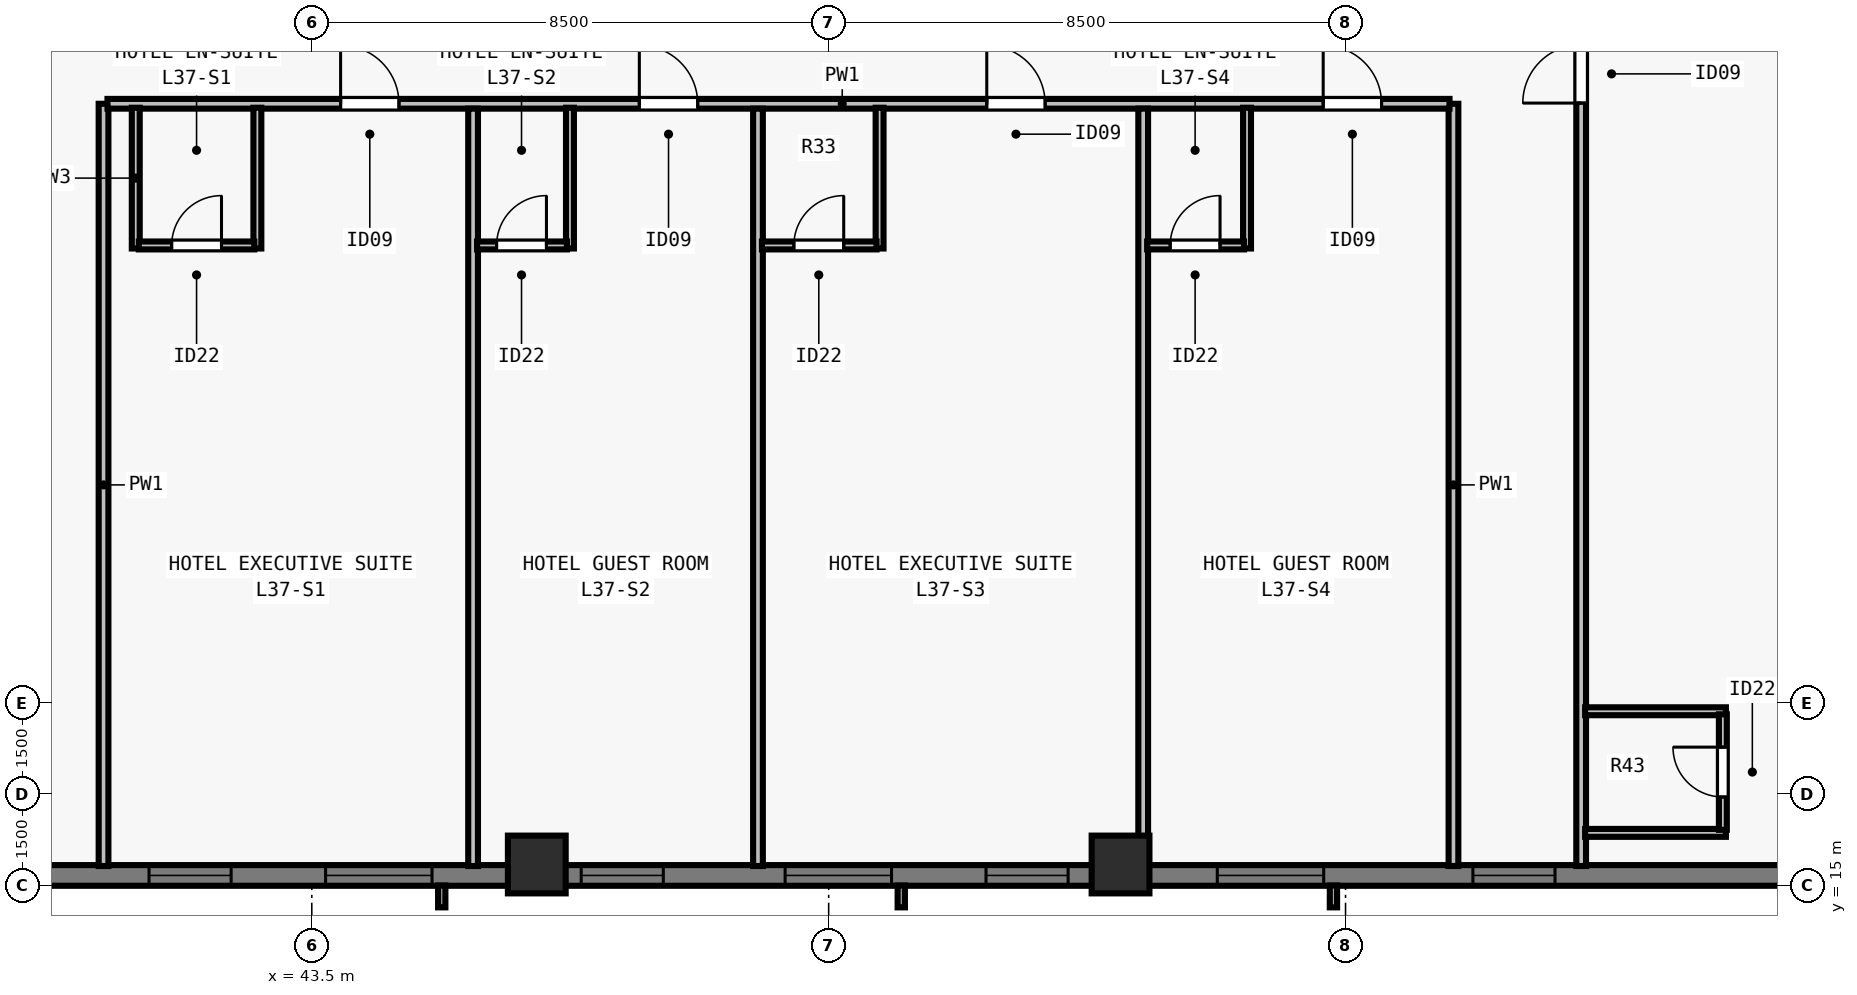
"""IFC4 building model, lengths in metres.
Left out: names, types, materials, properties, quantities, classifications, styles, units other than length and angle.
Written with IfcOpenShell. Run it as: python <this file> out.ifc"""

import sys

from ifc_helpers import new_model, si_unit, direction, frame, frame_2d, origin, origin_2d, place, context, subcontext, project, spatial, rectangle, extrude, element, fill, save


model = new_model("IFC4")
c1 = context("Model", 3, precision=1e-05, world=origin(), true_north=direction((0.0, 1.0)))
c2 = subcontext(c1, "Body", "Model", "MODEL_VIEW")
j1 = project(units=[si_unit("LENGTHUNIT", "METRE"), si_unit("PLANEANGLEUNIT", "RADIAN")], contexts=[c1])
p1 = place(None, origin())
s1 = spatial("IfcSite", under=j1, at=p1, CompositionType="ELEMENT")
p2 = place(p1, origin())
s2 = spatial("IfcBuilding", under=s1, at=p2, CompositionType="ELEMENT")
p3 = place(p2, frame((0.0, 0.0, 137.5)))
s3 = spatial("IfcBuildingStorey", under=s2, at=p3, CompositionType="ELEMENT", Elevation=137.5)
for number, where, z_axis, x_axis in (
    (1, (47.2, 15.35, 0.0), (0.0, 0.0, 1.0), (1.0, 0.0, 0.0)),
    (2, (56.8, 15.35, 0.0), (0.0, 0.0, 1.0), (1.0, 0.0, 0.0)),
):
    element("IfcColumn", number, at=place(p3, frame(where, z_axis=z_axis, x_axis=x_axis)), inside=s3, PredefinedType="COLUMN", context=c2, shape_type="SweptSolid", body=[
        extrude(rectangle(XDim=0.95, YDim=0.95, at=origin_2d()), origin(), (0.0, 0.0, 1.0), 3.5),
    ])
p4 = place(p3, frame((72.0, 15.17, 0.0), z_axis=(0.0, 0.0, 1.0), x_axis=(-1.0, 0.0, 0.0)))
e3 = element("IfcWall", 3, at=p4, inside=s3, PredefinedType="SOLIDWALL", context=c2, shape_type="SweptSolid", body=[
    extrude(rectangle(XDim=39.682, YDim=0.34, at=frame_2d((19.841, 0.0))), origin(), (0.0, 0.0, 1.0), 3.28),
])
p5 = place(p4, frame((8.055, 0.0, 0.8)))
e4 = element("IfcOpeningElement", 4, at=p5, cuts=e3, PredefinedType="OPENING", context=c2, shape_type="SweptSolid", body=[
    extrude(rectangle(XDim=1.35, YDim=1.66, at=frame_2d((0.675, 0.83))), frame((0.0, 0.18, 0.0), z_axis=(0.0, -1.0, 0.0), x_axis=(1.0, 0.0, 0.0)), (0.0, 0.0, 1.0), 0.36),
])
p6 = place(p4, frame((11.859, 0.0, 0.8)))
e5 = element("IfcOpeningElement", 5, at=p6, cuts=e3, PredefinedType="OPENING", context=c2, shape_type="SweptSolid", body=[
    extrude(rectangle(XDim=1.75, YDim=1.66, at=frame_2d((0.875, 0.83))), frame((0.0, 0.18, 0.0), z_axis=(0.0, -1.0, 0.0), x_axis=(1.0, 0.0, 0.0)), (0.0, 0.0, 1.0), 0.36),
])
p7 = place(p4, frame((16.062, 0.0, 0.8)))
e6 = element("IfcOpeningElement", 6, at=p7, cuts=e3, PredefinedType="OPENING", context=c2, shape_type="SweptSolid", body=[
    extrude(rectangle(XDim=1.35, YDim=1.66, at=frame_2d((0.675, 0.83))), frame((0.0, 0.18, 0.0), z_axis=(0.0, -1.0, 0.0), x_axis=(1.0, 0.0, 0.0)), (0.0, 0.0, 1.0), 0.36),
])
p8 = place(p4, frame((18.966, 0.0, 0.8)))
e7 = element("IfcOpeningElement", 7, at=p8, cuts=e3, PredefinedType="OPENING", context=c2, shape_type="SweptSolid", body=[
    extrude(rectangle(XDim=1.75, YDim=1.66, at=frame_2d((0.875, 0.83))), frame((0.0, 0.18, 0.0), z_axis=(0.0, -1.0, 0.0), x_axis=(1.0, 0.0, 0.0)), (0.0, 0.0, 1.0), 0.36),
])
p9 = place(p4, frame((22.719, 0.0, 0.8)))
e8 = element("IfcOpeningElement", 8, at=p9, cuts=e3, PredefinedType="OPENING", context=c2, shape_type="SweptSolid", body=[
    extrude(rectangle(XDim=1.35, YDim=1.66, at=frame_2d((0.675, 0.83))), frame((0.0, 0.18, 0.0), z_axis=(0.0, -1.0, 0.0), x_axis=(1.0, 0.0, 0.0)), (0.0, 0.0, 1.0), 0.36),
])
p10 = place(p4, frame((26.523, 0.0, 0.8)))
e9 = element("IfcOpeningElement", 9, at=p10, cuts=e3, PredefinedType="OPENING", context=c2, shape_type="SweptSolid", body=[
    extrude(rectangle(XDim=1.75, YDim=1.66, at=frame_2d((0.875, 0.83))), frame((0.0, 0.18, 0.0), z_axis=(0.0, -1.0, 0.0), x_axis=(1.0, 0.0, 0.0)), (0.0, 0.0, 1.0), 0.36),
])
p11 = place(p4, frame((29.827, 0.0, 0.8)))
e10 = element("IfcOpeningElement", 10, at=p11, cuts=e3, PredefinedType="OPENING", context=c2, shape_type="SweptSolid", body=[
    extrude(rectangle(XDim=1.35, YDim=1.66, at=frame_2d((0.675, 0.83))), frame((0.0, 0.18, 0.0), z_axis=(0.0, -1.0, 0.0), x_axis=(1.0, 0.0, 0.0)), (0.0, 0.0, 1.0), 0.36),
])
p12 = place(p3, frame((40.075, 15.325, 0.0), z_axis=(0.0, 0.0, 1.0), x_axis=(0.0, 1.0, 0.0)))
e11 = element("IfcWall", 11, at=p12, inside=s3, PredefinedType="PARTITIONING", context=c2, shape_type="SweptSolid", body=[
    extrude(rectangle(XDim=12.535, YDim=0.16, at=frame_2d((6.268, 0.0))), origin(), (0.0, 0.0, 1.0), 2.555),
])
p13 = place(p3, frame((64.375, 15.325, 0.0), z_axis=(0.0, 0.0, 1.0), x_axis=(0.0, 1.0, 0.0)))
e12 = element("IfcWall", 12, at=p13, inside=s3, PredefinedType="PARTITIONING", context=c2, shape_type="SweptSolid", body=[
    extrude(rectangle(XDim=47.35, YDim=0.16, at=frame_2d((23.675, 0.0))), origin(), (0.0, 0.0, 1.0), 2.555),
])
p14 = place(p13, frame((12.547, 0.0, 0.0)))
e13 = element("IfcOpeningElement", 13, at=p14, cuts=e12, PredefinedType="OPENING", context=c2, shape_type="SweptSolid", body=[
    extrude(rectangle(XDim=0.96, YDim=2.15, at=frame_2d((0.48, 1.075))), frame((0.0, 0.09, 0.0), z_axis=(0.0, -1.0, 0.0), x_axis=(1.0, 0.0, 0.0)), (0.0, 0.0, 1.0), 0.18),
])
p15 = place(p13, frame((35.902, 0.0, 0.0)))
e14 = element("IfcOpeningElement", 14, at=p15, cuts=e12, PredefinedType="OPENING", context=c2, shape_type="SweptSolid", body=[
    extrude(rectangle(XDim=0.96, YDim=2.15, at=frame_2d((0.48, 1.075))), frame((0.0, 0.09, 0.0), z_axis=(0.0, -1.0, 0.0), x_axis=(1.0, 0.0, 0.0)), (0.0, 0.0, 1.0), 0.18),
])
p16 = place(p3, frame((62.275, 15.325, 0.0), z_axis=(0.0, 0.0, 1.0), x_axis=(0.0, 1.0, 0.0)))
e15 = element("IfcWall", 15, at=p16, inside=s3, PredefinedType="PARTITIONING", context=c2, shape_type="SweptSolid", body=[
    extrude(rectangle(XDim=12.535, YDim=0.16, at=frame_2d((6.268, 0.0))), origin(), (0.0, 0.0, 1.0), 3.28),
])
p17 = place(p3, frame((40.14, 27.86, 0.0), z_axis=(0.0, 0.0, 1.0), x_axis=(1.0, 0.0, 0.0)))
e16 = element("IfcWall", 16, at=p17, inside=s3, PredefinedType="PARTITIONING", context=c2, shape_type="SweptSolid", body=[
    extrude(rectangle(XDim=22.07, YDim=0.16, at=frame_2d((11.035, 0.0))), origin(), (0.0, 0.0, 1.0), 3.28),
])
p18 = place(p17, frame((3.834, 0.0, 0.0)))
e17 = element("IfcOpeningElement", 17, at=p18, cuts=e16, PredefinedType="OPENING", context=c2, shape_type="SweptSolid", body=[
    extrude(rectangle(XDim=0.96, YDim=2.15, at=frame_2d((0.48, 1.075))), frame((0.0, 0.09, 0.0), z_axis=(0.0, -1.0, 0.0), x_axis=(1.0, 0.0, 0.0)), (0.0, 0.0, 1.0), 0.18),
])
p19 = place(p17, frame((8.746, 0.0, 0.0)))
e18 = element("IfcOpeningElement", 18, at=p19, cuts=e16, PredefinedType="OPENING", context=c2, shape_type="SweptSolid", body=[
    extrude(rectangle(XDim=0.96, YDim=2.15, at=frame_2d((0.48, 1.075))), frame((0.0, 0.09, 0.0), z_axis=(0.0, -1.0, 0.0), x_axis=(1.0, 0.0, 0.0)), (0.0, 0.0, 1.0), 0.18),
])
p20 = place(p17, frame((14.46, 0.0, 0.0)))
e19 = element("IfcOpeningElement", 19, at=p20, cuts=e16, PredefinedType="OPENING", context=c2, shape_type="SweptSolid", body=[
    extrude(rectangle(XDim=0.96, YDim=2.15, at=frame_2d((0.48, 1.075))), frame((0.0, 0.09, 0.0), z_axis=(0.0, -1.0, 0.0), x_axis=(1.0, 0.0, 0.0)), (0.0, 0.0, 1.0), 0.18),
])
p21 = place(p17, frame((19.993, 0.0, 0.0)))
e20 = element("IfcOpeningElement", 20, at=p21, cuts=e16, PredefinedType="OPENING", context=c2, shape_type="SweptSolid", body=[
    extrude(rectangle(XDim=0.96, YDim=2.15, at=frame_2d((0.48, 1.075))), frame((0.0, 0.09, 0.0), z_axis=(0.0, -1.0, 0.0), x_axis=(1.0, 0.0, 0.0)), (0.0, 0.0, 1.0), 0.18),
])
p22 = place(p3, frame((40.605, 25.48, 0.0), z_axis=(0.0, 0.0, 1.0), x_axis=(0.0, 1.0, 0.0)))
e21 = element("IfcWall", 21, at=p22, inside=s3, PredefinedType="PLUMBINGWALL", context=c2, shape_type="SweptSolid", body=[
    extrude(rectangle(XDim=2.315, YDim=0.13, at=frame_2d((1.157, 0.0))), origin(), (0.0, 0.0, 1.0), 2.555),
])
p23 = place(p3, frame((42.605, 25.48, 0.0), z_axis=(0.0, 0.0, 1.0), x_axis=(0.0, 1.0, 0.0)))
e22 = element("IfcWall", 22, at=p23, inside=s3, PredefinedType="PLUMBINGWALL", context=c2, shape_type="SweptSolid", body=[
    extrude(rectangle(XDim=2.315, YDim=0.13, at=frame_2d((1.157, 0.0))), origin(), (0.0, 0.0, 1.0), 3.28),
])
p24 = place(p3, frame((40.655, 25.53, 0.0), z_axis=(0.0, 0.0, 1.0), x_axis=(1.0, 0.0, 0.0)))
e23 = element("IfcWall", 23, at=p24, inside=s3, PredefinedType="PLUMBINGWALL", context=c2, shape_type="SweptSolid", body=[
    extrude(rectangle(XDim=1.9, YDim=0.13, at=frame_2d((0.95, 0.0))), origin(), (0.0, 0.0, 1.0), 3.28),
])
p25 = place(p24, frame((0.54, 0.0, 0.0)))
e24 = element("IfcOpeningElement", 24, at=p25, cuts=e23, PredefinedType="OPENING", context=c2, shape_type="SweptSolid", body=[
    extrude(rectangle(XDim=0.82, YDim=2.1, at=frame_2d((0.41, 1.05))), frame((0.0, 0.075, 0.0), z_axis=(0.0, -1.0, 0.0), x_axis=(1.0, 0.0, 0.0)), (0.0, 0.0, 1.0), 0.15),
])
p26 = place(p3, frame((46.153, 15.325, 0.0), z_axis=(0.0, 0.0, 1.0), x_axis=(0.0, 1.0, 0.0)))
e25 = element("IfcWall", 25, at=p26, inside=s3, PredefinedType="PARTITIONING", context=c2, shape_type="SweptSolid", body=[
    extrude(rectangle(XDim=12.455, YDim=0.16, at=frame_2d((6.228, 0.0))), origin(), (0.0, 0.0, 1.0), 3.28),
])
p27 = place(p3, frame((47.745, 25.48, 0.0), z_axis=(0.0, 0.0, 1.0), x_axis=(0.0, 1.0, 0.0)))
e26 = element("IfcWall", 26, at=p27, inside=s3, PredefinedType="PLUMBINGWALL", context=c2, shape_type="SweptSolid", body=[
    extrude(rectangle(XDim=2.315, YDim=0.13, at=frame_2d((1.157, 0.0))), origin(), (0.0, 0.0, 1.0), 3.28),
])
p28 = place(p3, frame((46.218, 25.53, 0.0), z_axis=(0.0, 0.0, 1.0), x_axis=(1.0, 0.0, 0.0)))
e27 = element("IfcWall", 27, at=p28, inside=s3, PredefinedType="PLUMBINGWALL", context=c2, shape_type="SweptSolid", body=[
    extrude(rectangle(XDim=1.478, YDim=0.13, at=frame_2d((0.739, 0.0))), origin(), (0.0, 0.0, 1.0), 3.28),
])
p29 = place(p28, frame((0.321, 0.0, 0.0)))
e28 = element("IfcOpeningElement", 28, at=p29, cuts=e27, PredefinedType="OPENING", context=c2, shape_type="SweptSolid", body=[
    extrude(rectangle(XDim=0.82, YDim=2.1, at=frame_2d((0.41, 1.05))), frame((0.0, 0.075, 0.0), z_axis=(0.0, -1.0, 0.0), x_axis=(1.0, 0.0, 0.0)), (0.0, 0.0, 1.0), 0.15),
])
p30 = place(p3, frame((50.837, 15.325, 0.0), z_axis=(0.0, 0.0, 1.0), x_axis=(0.0, 1.0, 0.0)))
e29 = element("IfcWall", 29, at=p30, inside=s3, PredefinedType="PARTITIONING", context=c2, shape_type="SweptSolid", body=[
    extrude(rectangle(XDim=12.455, YDim=0.16, at=frame_2d((6.228, 0.0))), origin(), (0.0, 0.0, 1.0), 2.896),
])
p31 = place(p3, frame((52.837, 25.48, 0.0), z_axis=(0.0, 0.0, 1.0), x_axis=(0.0, 1.0, 0.0)))
e30 = element("IfcWall", 30, at=p31, inside=s3, PredefinedType="PLUMBINGWALL", context=c2, shape_type="SweptSolid", body=[
    extrude(rectangle(XDim=2.315, YDim=0.13, at=frame_2d((1.157, 0.0))), origin(), (0.0, 0.0, 1.0), 3.28),
])
p32 = place(p3, frame((50.903, 25.53, 0.0), z_axis=(0.0, 0.0, 1.0), x_axis=(1.0, 0.0, 0.0)))
e31 = element("IfcWall", 31, at=p32, inside=s3, PredefinedType="PLUMBINGWALL", context=c2, shape_type="SweptSolid", body=[
    extrude(rectangle(XDim=1.885, YDim=0.13, at=frame_2d((0.942, 0.0))), origin(), (0.0, 0.0, 1.0), 3.28),
])
p33 = place(p32, frame((0.525, 0.0, 0.0)))
e32 = element("IfcOpeningElement", 32, at=p33, cuts=e31, PredefinedType="OPENING", context=c2, shape_type="SweptSolid", body=[
    extrude(rectangle(XDim=0.82, YDim=2.1, at=frame_2d((0.41, 1.05))), frame((0.0, 0.075, 0.0), z_axis=(0.0, -1.0, 0.0), x_axis=(1.0, 0.0, 0.0)), (0.0, 0.0, 1.0), 0.15),
])
p34 = place(p3, frame((57.173, 15.325, 0.0), z_axis=(0.0, 0.0, 1.0), x_axis=(0.0, 1.0, 0.0)))
e33 = element("IfcWall", 33, at=p34, inside=s3, PredefinedType="PARTITIONING", context=c2, shape_type="SweptSolid", body=[
    extrude(rectangle(XDim=12.455, YDim=0.16, at=frame_2d((6.228, 0.0))), origin(), (0.0, 0.0, 1.0), 3.28),
])
p35 = place(p3, frame((58.88, 25.48, 0.0), z_axis=(0.0, 0.0, 1.0), x_axis=(0.0, 1.0, 0.0)))
e34 = element("IfcWall", 34, at=p35, inside=s3, PredefinedType="PLUMBINGWALL", context=c2, shape_type="SweptSolid", body=[
    extrude(rectangle(XDim=2.315, YDim=0.13, at=frame_2d((1.157, 0.0))), origin(), (0.0, 0.0, 1.0), 3.28),
])
p36 = place(p3, frame((57.238, 25.53, 0.0), z_axis=(0.0, 0.0, 1.0), x_axis=(1.0, 0.0, 0.0)))
e35 = element("IfcWall", 35, at=p36, inside=s3, PredefinedType="PLUMBINGWALL", context=c2, shape_type="SweptSolid", body=[
    extrude(rectangle(XDim=1.593, YDim=0.13, at=frame_2d((0.796, 0.0))), origin(), (0.0, 0.0, 1.0), 3.28),
])
p37 = place(p36, frame((0.379, 0.0, 0.0)))
e36 = element("IfcOpeningElement", 36, at=p37, cuts=e35, PredefinedType="OPENING", context=c2, shape_type="SweptSolid", body=[
    extrude(rectangle(XDim=0.82, YDim=2.1, at=frame_2d((0.41, 1.05))), frame((0.0, 0.075, 0.0), z_axis=(0.0, -1.0, 0.0), x_axis=(1.0, 0.0, 0.0)), (0.0, 0.0, 1.0), 0.15),
])
for number, where, z_axis, x_axis in (
    (37, (64.44, 15.87, 0.0), (0.0, 0.0, 1.0), (1.0, 0.0, 0.0)),
    (38, (64.44, 17.87, 0.0), (0.0, 0.0, 1.0), (1.0, 0.0, 0.0)),
):
    element("IfcWall", number, at=place(p3, frame(where, z_axis=z_axis, x_axis=x_axis)), inside=s3, PredefinedType="PLUMBINGWALL", context=c2, shape_type="SweptSolid", body=[
        extrude(rectangle(XDim=2.315, YDim=0.13, at=frame_2d((1.157, 0.0))), origin(), (0.0, 0.0, 1.0), 3.28),
    ])
p38 = place(p3, frame((66.705, 15.92, 0.0), z_axis=(0.0, 0.0, 1.0), x_axis=(0.0, 1.0, 0.0)))
e39 = element("IfcWall", 39, at=p38, inside=s3, PredefinedType="PLUMBINGWALL", context=c2, shape_type="SweptSolid", body=[
    extrude(rectangle(XDim=1.9, YDim=0.13, at=frame_2d((0.95, 0.0))), origin(), (0.0, 0.0, 1.0), 3.28),
])
p39 = place(p38, frame((0.54, 0.0, 0.0)))
e40 = element("IfcOpeningElement", 40, at=p39, cuts=e39, PredefinedType="OPENING", context=c2, shape_type="SweptSolid", body=[
    extrude(rectangle(XDim=0.82, YDim=2.1, at=frame_2d((0.41, 1.05))), frame((0.0, 0.075, 0.0), z_axis=(0.0, -1.0, 0.0), x_axis=(1.0, 0.0, 0.0)), (0.0, 0.0, 1.0), 0.15),
])
p40 = place(p5, origin())
e41 = element("IfcWindow", 41, at=p40, inside=s3, PartitioningType="SINGLE_PANEL", PredefinedType="WINDOW", context=c2, shape_type="SweptSolid", body=[
    extrude(rectangle(XDim=1.35, YDim=1.66, at=frame_2d((0.675, 0.83))), frame((0.0, -0.05, 0.0), z_axis=(0.0, -1.0, 0.0), x_axis=(1.0, 0.0, 0.0)), (0.0, 0.0, 1.0), 0.06),
])
fill(e4, e41)
p41 = place(p6, origin())
e42 = element("IfcWindow", 42, at=p41, inside=s3, PartitioningType="SINGLE_PANEL", PredefinedType="WINDOW", context=c2, shape_type="SweptSolid", body=[
    extrude(rectangle(XDim=1.75, YDim=1.66, at=frame_2d((0.875, 0.83))), frame((0.0, -0.05, 0.0), z_axis=(0.0, -1.0, 0.0), x_axis=(1.0, 0.0, 0.0)), (0.0, 0.0, 1.0), 0.06),
])
fill(e5, e42)
p42 = place(p7, origin())
e43 = element("IfcWindow", 43, at=p42, inside=s3, PartitioningType="SINGLE_PANEL", PredefinedType="WINDOW", context=c2, shape_type="SweptSolid", body=[
    extrude(rectangle(XDim=1.35, YDim=1.66, at=frame_2d((0.675, 0.83))), frame((0.0, -0.05, 0.0), z_axis=(0.0, -1.0, 0.0), x_axis=(1.0, 0.0, 0.0)), (0.0, 0.0, 1.0), 0.06),
])
fill(e6, e43)
p43 = place(p8, origin())
e44 = element("IfcWindow", 44, at=p43, inside=s3, PartitioningType="SINGLE_PANEL", PredefinedType="WINDOW", context=c2, shape_type="SweptSolid", body=[
    extrude(rectangle(XDim=1.75, YDim=1.66, at=frame_2d((0.875, 0.83))), frame((0.0, -0.05, 0.0), z_axis=(0.0, -1.0, 0.0), x_axis=(1.0, 0.0, 0.0)), (0.0, 0.0, 1.0), 0.06),
])
fill(e7, e44)
p44 = place(p9, origin())
e45 = element("IfcWindow", 45, at=p44, inside=s3, PartitioningType="SINGLE_PANEL", PredefinedType="WINDOW", context=c2, shape_type="SweptSolid", body=[
    extrude(rectangle(XDim=1.35, YDim=1.66, at=frame_2d((0.675, 0.83))), frame((0.0, -0.05, 0.0), z_axis=(0.0, -1.0, 0.0), x_axis=(1.0, 0.0, 0.0)), (0.0, 0.0, 1.0), 0.06),
])
fill(e8, e45)
p45 = place(p10, origin())
e46 = element("IfcWindow", 46, at=p45, inside=s3, PartitioningType="SINGLE_PANEL", PredefinedType="WINDOW", context=c2, shape_type="SweptSolid", body=[
    extrude(rectangle(XDim=1.75, YDim=1.66, at=frame_2d((0.875, 0.83))), frame((0.0, -0.05, 0.0), z_axis=(0.0, -1.0, 0.0), x_axis=(1.0, 0.0, 0.0)), (0.0, 0.0, 1.0), 0.06),
])
fill(e9, e46)
p46 = place(p11, origin())
e47 = element("IfcWindow", 47, at=p46, inside=s3, PartitioningType="SINGLE_PANEL", PredefinedType="WINDOW", context=c2, shape_type="SweptSolid", body=[
    extrude(rectangle(XDim=1.35, YDim=1.66, at=frame_2d((0.675, 0.83))), frame((0.0, -0.05, 0.0), z_axis=(0.0, -1.0, 0.0), x_axis=(1.0, 0.0, 0.0)), (0.0, 0.0, 1.0), 0.06),
])
fill(e10, e47)
p47 = place(p25, origin())
e48 = element("IfcDoor", 48, at=p47, inside=s3, OperationType="SINGLE_SWING_RIGHT", PredefinedType="DOOR", context=c2, shape_type="SweptSolid", body=[
    extrude(rectangle(XDim=0.82, YDim=2.1, at=frame_2d((0.41, 1.05))), frame((0.0, 0.025, 0.0), z_axis=(0.0, -1.0, 0.0), x_axis=(1.0, 0.0, 0.0)), (0.0, 0.0, 1.0), 0.05),
])
fill(e24, e48)
p48 = place(p18, origin())
e49 = element("IfcDoor", 49, at=p48, inside=s3, OperationType="SINGLE_SWING_LEFT", PredefinedType="DOOR", context=c2, shape_type="SweptSolid", body=[
    extrude(rectangle(XDim=0.96, YDim=2.15, at=frame_2d((0.48, 1.075))), frame((0.0, 0.025, 0.0), z_axis=(0.0, -1.0, 0.0), x_axis=(1.0, 0.0, 0.0)), (0.0, 0.0, 1.0), 0.05),
])
fill(e17, e49)
p49 = place(p29, origin())
e50 = element("IfcDoor", 50, at=p49, inside=s3, OperationType="SINGLE_SWING_RIGHT", PredefinedType="DOOR", context=c2, shape_type="SweptSolid", body=[
    extrude(rectangle(XDim=0.82, YDim=2.1, at=frame_2d((0.41, 1.05))), frame((0.0, 0.025, 0.0), z_axis=(0.0, -1.0, 0.0), x_axis=(1.0, 0.0, 0.0)), (0.0, 0.0, 1.0), 0.05),
])
fill(e28, e50)
p50 = place(p19, origin())
e51 = element("IfcDoor", 51, at=p50, inside=s3, OperationType="SINGLE_SWING_LEFT", PredefinedType="DOOR", context=c2, shape_type="SweptSolid", body=[
    extrude(rectangle(XDim=0.96, YDim=2.15, at=frame_2d((0.48, 1.075))), frame((0.0, 0.025, 0.0), z_axis=(0.0, -1.0, 0.0), x_axis=(1.0, 0.0, 0.0)), (0.0, 0.0, 1.0), 0.05),
])
fill(e18, e51)
p51 = place(p33, origin())
e52 = element("IfcDoor", 52, at=p51, inside=s3, OperationType="SINGLE_SWING_RIGHT", PredefinedType="DOOR", context=c2, shape_type="SweptSolid", body=[
    extrude(rectangle(XDim=0.82, YDim=2.1, at=frame_2d((0.41, 1.05))), frame((0.0, 0.025, 0.0), z_axis=(0.0, -1.0, 0.0), x_axis=(1.0, 0.0, 0.0)), (0.0, 0.0, 1.0), 0.05),
])
fill(e32, e52)
p52 = place(p20, origin())
e53 = element("IfcDoor", 53, at=p52, inside=s3, OperationType="SINGLE_SWING_LEFT", PredefinedType="DOOR", context=c2, shape_type="SweptSolid", body=[
    extrude(rectangle(XDim=0.96, YDim=2.15, at=frame_2d((0.48, 1.075))), frame((0.0, 0.025, 0.0), z_axis=(0.0, -1.0, 0.0), x_axis=(1.0, 0.0, 0.0)), (0.0, 0.0, 1.0), 0.05),
])
fill(e19, e53)
p53 = place(p37, origin())
e54 = element("IfcDoor", 54, at=p53, inside=s3, OperationType="SINGLE_SWING_RIGHT", PredefinedType="DOOR", context=c2, shape_type="SweptSolid", body=[
    extrude(rectangle(XDim=0.82, YDim=2.1, at=frame_2d((0.41, 1.05))), frame((0.0, 0.025, 0.0), z_axis=(0.0, -1.0, 0.0), x_axis=(1.0, 0.0, 0.0)), (0.0, 0.0, 1.0), 0.05),
])
fill(e36, e54)
p54 = place(p21, origin())
e55 = element("IfcDoor", 55, at=p54, inside=s3, OperationType="SINGLE_SWING_LEFT", PredefinedType="DOOR", context=c2, shape_type="SweptSolid", body=[
    extrude(rectangle(XDim=0.96, YDim=2.15, at=frame_2d((0.48, 1.075))), frame((0.0, 0.025, 0.0), z_axis=(0.0, -1.0, 0.0), x_axis=(1.0, 0.0, 0.0)), (0.0, 0.0, 1.0), 0.05),
])
fill(e20, e55)
p55 = place(p39, origin())
e56 = element("IfcDoor", 56, at=p55, inside=s3, OperationType="SINGLE_SWING_RIGHT", PredefinedType="DOOR", context=c2, shape_type="SweptSolid", body=[
    extrude(rectangle(XDim=0.82, YDim=2.1, at=frame_2d((0.41, 1.05))), frame((0.0, 0.025, 0.0), z_axis=(0.0, -1.0, 0.0), x_axis=(1.0, 0.0, 0.0)), (0.0, 0.0, 1.0), 0.05),
])
fill(e40, e56)
p56 = place(p14, origin())
e57 = element("IfcDoor", 57, at=p56, inside=s3, OperationType="SINGLE_SWING_LEFT", PredefinedType="DOOR", context=c2, shape_type="SweptSolid", body=[
    extrude(rectangle(XDim=0.96, YDim=2.15, at=frame_2d((0.48, 1.075))), frame((0.0, 0.025, 0.0), z_axis=(0.0, -1.0, 0.0), x_axis=(1.0, 0.0, 0.0)), (0.0, 0.0, 1.0), 0.05),
])
fill(e13, e57)
save(model, sys.argv[1])
